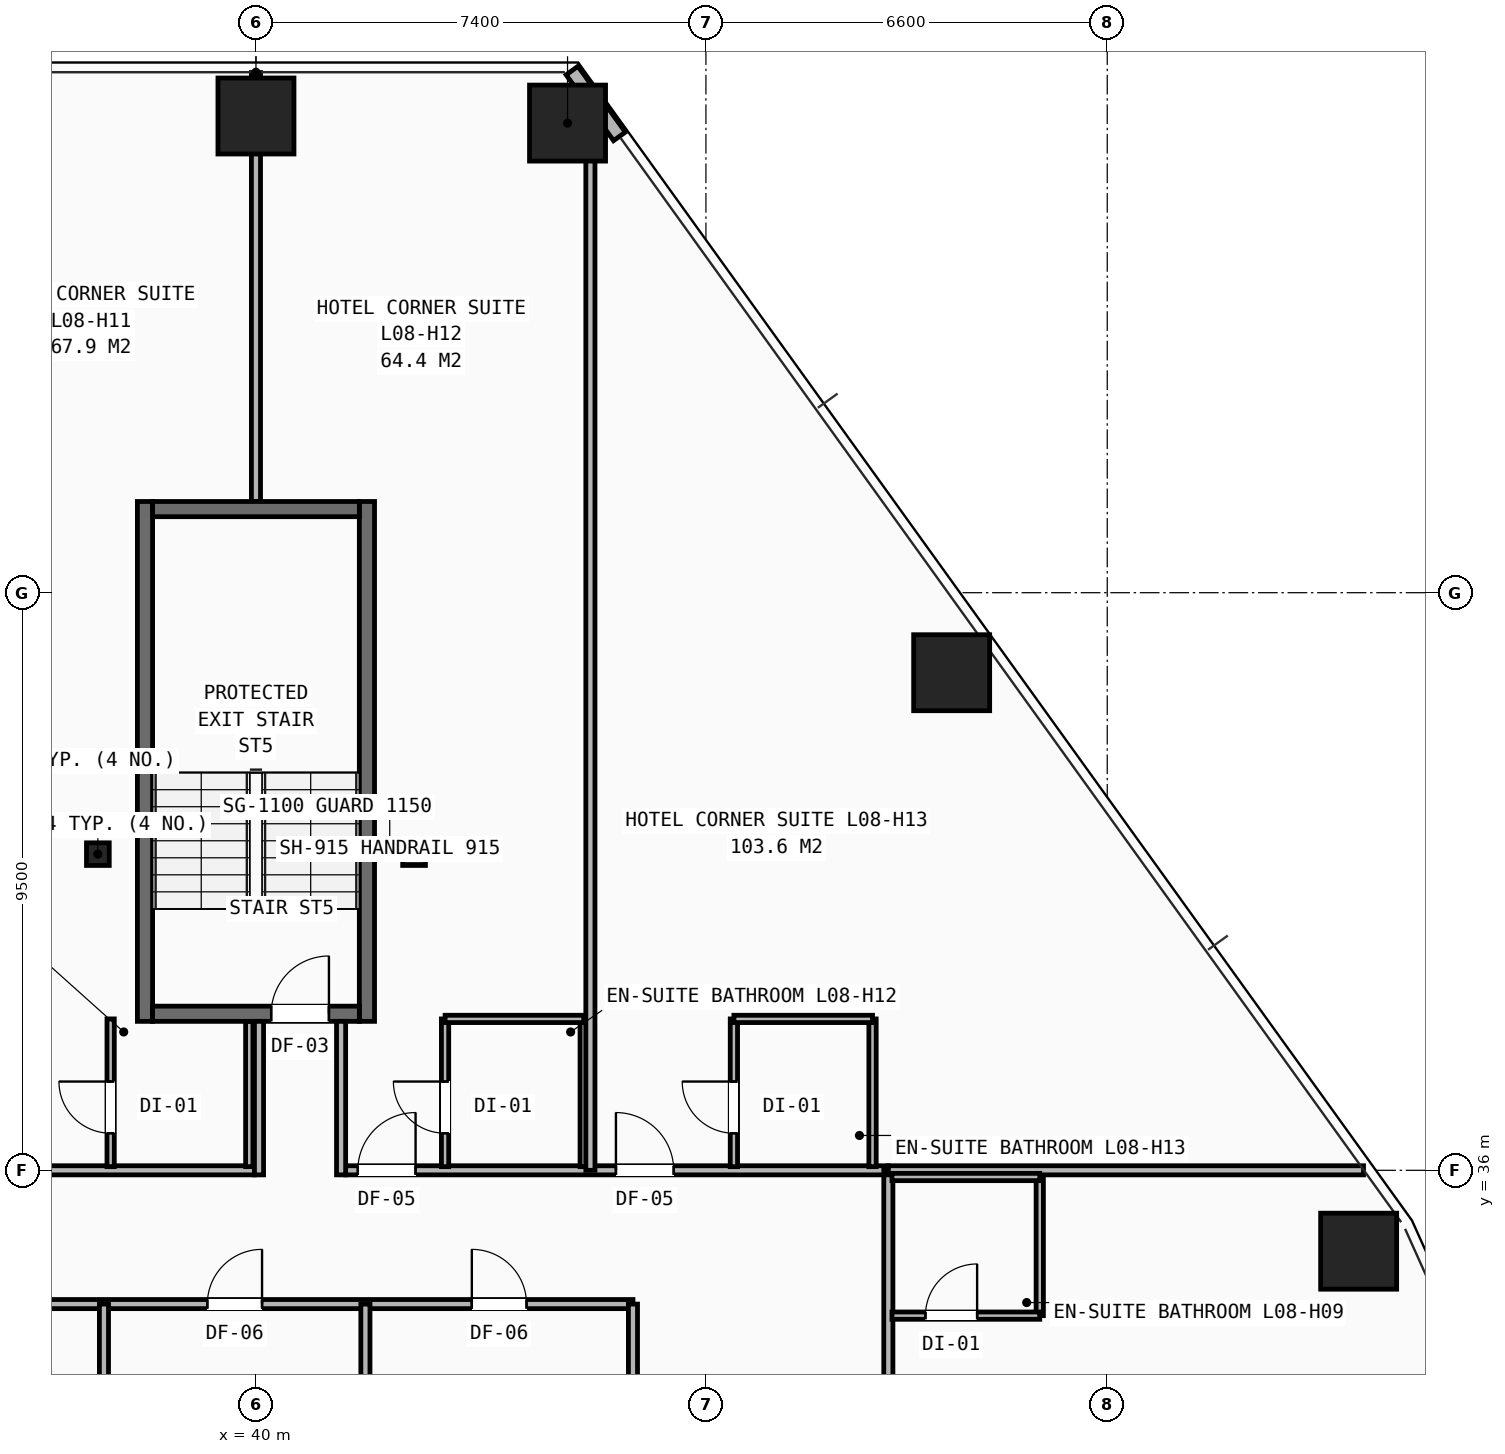
"""IFC4 building model, lengths in metres.
Left out: names, types, materials, properties, quantities, classifications, styles, units other than length and angle.
Written with IfcOpenShell. Run it as: python <this file> out.ifc"""

import sys

from ifc_helpers import new_model, si_unit, direction, frame, frame_2d, origin, origin_2d, place, context, subcontext, project, spatial, rectangle, hollow_rectangle, i_section, extrude, element, fill, save


model = new_model("IFC4")
c1 = context("Model", 3, precision=1e-05, world=origin(), true_north=direction((0.0, 1.0)))
c2 = subcontext(c1, "Body", "Model", "MODEL_VIEW")
j1 = project(units=[si_unit("LENGTHUNIT", "METRE"), si_unit("PLANEANGLEUNIT", "RADIAN")], contexts=[c1])
p1 = place(None, origin())
s1 = spatial("IfcSite", under=j1, at=p1, CompositionType="ELEMENT")
p2 = place(p1, origin())
s2 = spatial("IfcBuilding", under=s1, at=p2, CompositionType="ELEMENT")
p3 = place(p2, frame((0.0, 0.0, 33.6)))
s3 = spatial("IfcBuildingStorey", under=s2, at=p3, CompositionType="ELEMENT", Elevation=33.6)
for number, where, z_axis, x_axis in (
    (1, (37.4, 41.2, 0.0), (0.0, 0.0, 1.0), (1.0, 0.0, 0.0)),
    (2, (42.6, 41.2, 0.0), (0.0, 0.0, 1.0), (1.0, 0.0, 0.0)),
):
    element("IfcColumn", number, at=place(p3, frame(where, z_axis=z_axis, x_axis=x_axis)), inside=s3, PredefinedType="COLUMN", context=c2, shape_type="SweptSolid", body=[
        extrude(i_section(OverallWidth=0.374, OverallDepth=0.372, WebThickness=0.016, FlangeThickness=0.026, at=origin_2d()), origin(), (0.0, 0.0, 1.0), 3.2),
    ])
for number, where, z_axis, x_axis in (
    (3, (45.124, 53.223, 0.0), (0.0, 0.0, 1.0), (1.0, 0.0, 0.0)),
    (4, (40.0, 53.34, 0.0), (0.0, 0.0, 1.0), (1.0, 0.0, 0.0)),
    (5, (58.135, 34.67, 0.0), (0.0, 0.0, 1.0), (1.0, 0.0, 0.0)),
    (6, (51.441, 44.184, 0.0), (0.0, 0.0, 1.0), (1.0, 0.0, 0.0)),
):
    element("IfcColumn", number, at=place(p3, frame(where, z_axis=z_axis, x_axis=x_axis)), inside=s3, PredefinedType="COLUMN", context=c2, shape_type="SweptSolid", body=[
        extrude(hollow_rectangle(XDim=1.25, YDim=1.25, WallThickness=0.08, at=origin_2d()), origin(), (0.0, 0.0, 1.0), 3.2),
    ])
p4 = place(p3, frame((45.978, 53.005, 0.0), z_axis=(0.0, 0.0, 1.0), x_axis=(-0.584193864266, 0.811614150292, 0.0)))
e7 = element("IfcWall", 7, at=p4, inside=s3, PredefinedType="SHEAR", context=c2, shape_type="SweptSolid", body=[
    extrude(rectangle(XDim=1.334, YDim=0.24, at=frame_2d((0.667, 0.0))), origin(), (0.0, 0.0, 1.0), 2.263),
])
p5 = place(p3, frame((33.2, 33.8, 0.0), z_axis=(0.0, 0.0, 1.0), x_axis=(1.0, 0.0, 0.0)))
e8 = element("IfcWall", 8, at=p5, inside=s3, PredefinedType="PARTITIONING", context=c2, shape_type="SweptSolid", body=[
    extrude(rectangle(XDim=13.0, YDim=0.15, at=frame_2d((6.5, 0.0))), origin(), (0.0, 0.0, 1.0), 2.98),
])
p6 = place(p5, frame((1.7, 0.0, 0.0)))
e9 = element("IfcOpeningElement", 9, at=p6, cuts=e8, PredefinedType="OPENING", context=c2, shape_type="SweptSolid", body=[
    extrude(rectangle(XDim=0.9, YDim=2.1, at=frame_2d((0.45, 1.05))), frame((0.0, 0.085, 0.0), z_axis=(0.0, -1.0, 0.0), x_axis=(1.0, 0.0, 0.0)), (0.0, 0.0, 1.0), 0.17),
])
p7 = place(p5, frame((6.0, 0.0, 0.0)))
e10 = element("IfcOpeningElement", 10, at=p7, cuts=e8, PredefinedType="OPENING", context=c2, shape_type="SweptSolid", body=[
    extrude(rectangle(XDim=0.9, YDim=2.1, at=frame_2d((0.45, 1.05))), frame((0.0, 0.085, 0.0), z_axis=(0.0, -1.0, 0.0), x_axis=(1.0, 0.0, 0.0)), (0.0, 0.0, 1.0), 0.17),
])
p8 = place(p5, frame((10.35, 0.0, 0.0)))
e11 = element("IfcOpeningElement", 11, at=p8, cuts=e8, PredefinedType="OPENING", context=c2, shape_type="SweptSolid", body=[
    extrude(rectangle(XDim=0.9, YDim=2.1, at=frame_2d((0.45, 1.05))), frame((0.0, 0.085, 0.0), z_axis=(0.0, -1.0, 0.0), x_axis=(1.0, 0.0, 0.0)), (0.0, 0.0, 1.0), 0.17),
])
for number, where, z_axis, x_axis in (
    (12, (46.2, 31.2, 0.0), (0.0, 0.0, 1.0), (0.0, 1.0, 0.0)),
    (13, (37.5, 31.2, 0.0), (0.0, 0.0, 1.0), (0.0, 1.0, 0.0)),
    (14, (41.8, 31.2, 0.0), (0.0, 0.0, 1.0), (0.0, 1.0, 0.0)),
):
    element("IfcWall", number, at=place(p3, frame(where, z_axis=z_axis, x_axis=x_axis)), inside=s3, PredefinedType="PARTITIONING", context=c2, shape_type="SweptSolid", body=[
        extrude(rectangle(XDim=2.6, YDim=0.15, at=frame_2d((1.3, 0.0))), origin(), (0.0, 0.0, 1.0), 2.431),
    ])
p9 = place(p3, frame((29.6, 36.0, 0.0), z_axis=(0.0, 0.0, 1.0), x_axis=(1.0, 0.0, 0.0)))
e15 = element("IfcWall", 15, at=p9, inside=s3, PredefinedType="PARTITIONING", context=c2, shape_type="SweptSolid", body=[
    extrude(rectangle(XDim=10.375, YDim=0.15, at=frame_2d((5.188, 0.0))), origin(), (0.0, 0.0, 1.0), 2.98),
])
p10 = place(p9, frame((0.57, 0.0, 0.0)))
e16 = element("IfcOpeningElement", 16, at=p10, cuts=e15, PredefinedType="OPENING", context=c2, shape_type="SweptSolid", body=[
    extrude(rectangle(XDim=0.95, YDim=2.1, at=frame_2d((0.475, 1.05))), frame((0.0, 0.085, 0.0), z_axis=(0.0, -1.0, 0.0), x_axis=(1.0, 0.0, 0.0)), (0.0, 0.0, 1.0), 0.17),
])
p11 = place(p9, frame((5.32, 0.0, 0.0)))
e17 = element("IfcOpeningElement", 17, at=p11, cuts=e15, PredefinedType="OPENING", context=c2, shape_type="SweptSolid", body=[
    extrude(rectangle(XDim=0.95, YDim=2.1, at=frame_2d((0.475, 1.05))), frame((0.0, 0.085, 0.0), z_axis=(0.0, -1.0, 0.0), x_axis=(1.0, 0.0, 0.0)), (0.0, 0.0, 1.0), 0.17),
])
p12 = place(p3, frame((41.475, 36.0, 0.0), z_axis=(0.0, 0.0, 1.0), x_axis=(1.0, 0.0, 0.0)))
e18 = element("IfcWall", 18, at=p12, inside=s3, PredefinedType="PARTITIONING", context=c2, shape_type="SweptSolid", body=[
    extrude(rectangle(XDim=8.925, YDim=0.15, at=frame_2d((4.462, 0.0))), origin(), (0.0, 0.0, 1.0), 2.513),
])
p13 = place(p12, frame((0.2, 0.0, 0.0)))
e19 = element("IfcOpeningElement", 19, at=p13, cuts=e18, PredefinedType="OPENING", context=c2, shape_type="SweptSolid", body=[
    extrude(rectangle(XDim=0.95, YDim=2.1, at=frame_2d((0.475, 1.05))), frame((0.0, 0.085, 0.0), z_axis=(0.0, -1.0, 0.0), x_axis=(1.0, 0.0, 0.0)), (0.0, 0.0, 1.0), 0.17),
])
p14 = place(p12, frame((4.445, 0.0, 0.0)))
e20 = element("IfcOpeningElement", 20, at=p14, cuts=e18, PredefinedType="OPENING", context=c2, shape_type="SweptSolid", body=[
    extrude(rectangle(XDim=0.95, YDim=2.1, at=frame_2d((0.475, 1.05))), frame((0.0, 0.085, 0.0), z_axis=(0.0, -1.0, 0.0), x_axis=(1.0, 0.0, 0.0)), (0.0, 0.0, 1.0), 0.17),
])
p15 = place(p3, frame((50.4, 14.1, 0.0), z_axis=(0.0, 0.0, 1.0), x_axis=(0.0, 1.0, 0.0)))
e21 = element("IfcWall", 21, at=p15, inside=s3, PredefinedType="PARTITIONING", context=c2, shape_type="SweptSolid", body=[
    extrude(rectangle(XDim=21.9, YDim=0.15, at=frame_2d((10.95, 0.0))), origin(), (0.0, 0.0, 1.0), 2.191),
])
p16 = place(p15, frame((0.42, 0.0, 0.0)))
e22 = element("IfcOpeningElement", 22, at=p16, cuts=e21, PredefinedType="OPENING", context=c2, shape_type="SweptSolid", body=[
    extrude(rectangle(XDim=0.95, YDim=2.1, at=frame_2d((0.475, 1.05))), frame((0.0, 0.085, 0.0), z_axis=(0.0, -1.0, 0.0), x_axis=(1.0, 0.0, 0.0)), (0.0, 0.0, 1.0), 0.17),
])
p17 = place(p15, frame((7.82, 0.0, 0.0)))
e23 = element("IfcOpeningElement", 23, at=p17, cuts=e21, PredefinedType="OPENING", context=c2, shape_type="SweptSolid", body=[
    extrude(rectangle(XDim=0.95, YDim=2.1, at=frame_2d((0.475, 1.05))), frame((0.0, 0.085, 0.0), z_axis=(0.0, -1.0, 0.0), x_axis=(1.0, 0.0, 0.0)), (0.0, 0.0, 1.0), 0.17),
])
p18 = place(p15, frame((15.32, 0.0, 0.0)))
e24 = element("IfcOpeningElement", 24, at=p18, cuts=e21, PredefinedType="OPENING", context=c2, shape_type="SweptSolid", body=[
    extrude(rectangle(XDim=0.95, YDim=2.1, at=frame_2d((0.475, 1.05))), frame((0.0, 0.085, 0.0), z_axis=(0.0, -1.0, 0.0), x_axis=(1.0, 0.0, 0.0)), (0.0, 0.0, 1.0), 0.17),
])
p19 = place(p3, frame((50.4, 36.0, 0.0), z_axis=(0.0, 0.0, 1.0), x_axis=(1.0, 0.0, 0.0)))
e25 = element("IfcWall", 25, at=p19, inside=s3, PredefinedType="PARTITIONING", context=c2, shape_type="SweptSolid", body=[
    extrude(rectangle(XDim=7.814, YDim=0.15, at=frame_2d((3.907, 0.0))), origin(), (0.0, 0.0, 1.0), 2.268),
])
p20 = place(p3, frame((52.89, 33.61, 0.0), z_axis=(0.0, 0.0, 1.0), x_axis=(0.0, 1.0, 0.0)))
e26 = element("IfcWall", 26, at=p20, inside=s3, PredefinedType="PARTITIONING", context=c2, shape_type="SweptSolid", body=[
    extrude(rectangle(XDim=2.28, YDim=0.12, at=frame_2d((1.14, 0.0))), origin(), (0.0, 0.0, 1.0), 2.98),
])
p21 = place(p3, frame((50.46, 33.61, 0.0), z_axis=(0.0, 0.0, 1.0), x_axis=(1.0, 0.0, 0.0)))
e27 = element("IfcWall", 27, at=p21, inside=s3, PredefinedType="PARTITIONING", context=c2, shape_type="SweptSolid", body=[
    extrude(rectangle(XDim=2.43, YDim=0.12, at=frame_2d((1.215, 0.0))), origin(), (0.0, 0.0, 1.0), 2.513),
])
p22 = place(p21, frame((0.55, 0.0, 0.0)))
e28 = element("IfcOpeningElement", 28, at=p22, cuts=e27, PredefinedType="OPENING", context=c2, shape_type="SweptSolid", body=[
    extrude(rectangle(XDim=0.85, YDim=2.05, at=frame_2d((0.425, 1.025))), frame((0.0, 0.07, 0.0), z_axis=(0.0, -1.0, 0.0), x_axis=(1.0, 0.0, 0.0)), (0.0, 0.0, 1.0), 0.14),
])
p23 = place(p3, frame((50.46, 35.89, 0.0), z_axis=(0.0, 0.0, 1.0), x_axis=(1.0, 0.0, 0.0)))
e29 = element("IfcWall", 29, at=p23, inside=s3, PredefinedType="PARTITIONING", context=c2, shape_type="SweptSolid", body=[
    extrude(rectangle(XDim=2.43, YDim=0.12, at=frame_2d((1.215, 0.0))), origin(), (0.0, 0.0, 1.0), 2.513),
])
p24 = place(p3, frame((37.61, 36.06, 0.0), z_axis=(0.0, 0.0, 1.0), x_axis=(0.0, 1.0, 0.0)))
e30 = element("IfcWall", 30, at=p24, inside=s3, PredefinedType="PARTITIONING", context=c2, shape_type="SweptSolid", body=[
    extrude(rectangle(XDim=2.43, YDim=0.12, at=frame_2d((1.215, 0.0))), origin(), (0.0, 0.0, 1.0), 2.98),
])
p25 = place(p24, frame((0.55, 0.0, 0.0)))
e31 = element("IfcOpeningElement", 31, at=p25, cuts=e30, PredefinedType="OPENING", context=c2, shape_type="SweptSolid", body=[
    extrude(rectangle(XDim=0.85, YDim=2.05, at=frame_2d((0.425, 1.025))), frame((0.0, 0.07, 0.0), z_axis=(0.0, -1.0, 0.0), x_axis=(1.0, 0.0, 0.0)), (0.0, 0.0, 1.0), 0.14),
])
p26 = place(p3, frame((39.89, 36.06, 0.0), z_axis=(0.0, 0.0, 1.0), x_axis=(0.0, 1.0, 0.0)))
e32 = element("IfcWall", 32, at=p26, inside=s3, PredefinedType="PARTITIONING", context=c2, shape_type="SweptSolid", body=[
    extrude(rectangle(XDim=2.39, YDim=0.12, at=frame_2d((1.195, 0.0))), origin(), (0.0, 0.0, 1.0), 2.98),
])
p27 = place(p3, frame((40.0, 47.0, 0.0), z_axis=(0.0, 0.0, 1.0), x_axis=(0.0, 1.0, 0.0)))
e33 = element("IfcWall", 33, at=p27, inside=s3, PredefinedType="PARTITIONING", context=c2, shape_type="SweptSolid", body=[
    extrude(rectangle(XDim=7.055, YDim=0.15, at=frame_2d((3.528, 0.0))), origin(), (0.0, 0.0, 1.0), 2.268),
])
p28 = place(p3, frame((43.11, 36.06, 0.0), z_axis=(0.0, 0.0, 1.0), x_axis=(0.0, 1.0, 0.0)))
e34 = element("IfcWall", 34, at=p28, inside=s3, PredefinedType="PARTITIONING", context=c2, shape_type="SweptSolid", body=[
    extrude(rectangle(XDim=2.43, YDim=0.12, at=frame_2d((1.215, 0.0))), origin(), (0.0, 0.0, 1.0), 2.98),
])
p29 = place(p28, frame((0.55, 0.0, 0.0)))
e35 = element("IfcOpeningElement", 35, at=p29, cuts=e34, PredefinedType="OPENING", context=c2, shape_type="SweptSolid", body=[
    extrude(rectangle(XDim=0.85, YDim=2.05, at=frame_2d((0.425, 1.025))), frame((0.0, 0.07, 0.0), z_axis=(0.0, -1.0, 0.0), x_axis=(1.0, 0.0, 0.0)), (0.0, 0.0, 1.0), 0.14),
])
p30 = place(p3, frame((45.39, 36.06, 0.0), z_axis=(0.0, 0.0, 1.0), x_axis=(0.0, 1.0, 0.0)))
e36 = element("IfcWall", 36, at=p30, inside=s3, PredefinedType="PARTITIONING", context=c2, shape_type="SweptSolid", body=[
    extrude(rectangle(XDim=2.43, YDim=0.12, at=frame_2d((1.215, 0.0))), origin(), (0.0, 0.0, 1.0), 2.98),
])
p31 = place(p3, frame((43.11, 38.49, 0.0), z_axis=(0.0, 0.0, 1.0), x_axis=(1.0, 0.0, 0.0)))
e37 = element("IfcWall", 37, at=p31, inside=s3, PredefinedType="PARTITIONING", context=c2, shape_type="SweptSolid", body=[
    extrude(rectangle(XDim=2.28, YDim=0.12, at=frame_2d((1.14, 0.0))), origin(), (0.0, 0.0, 1.0), 2.98),
])
p32 = place(p3, frame((45.5, 36.0, 0.0), z_axis=(0.0, 0.0, 1.0), x_axis=(0.0, 1.0, 0.0)))
e38 = element("IfcWall", 38, at=p32, inside=s3, PredefinedType="PARTITIONING", context=c2, shape_type="SweptSolid", body=[
    extrude(rectangle(XDim=17.66, YDim=0.15, at=frame_2d((8.83, 0.0))), origin(), (0.0, 0.0, 1.0), 2.191),
])
p33 = place(p3, frame((47.86, 36.06, 0.0), z_axis=(0.0, 0.0, 1.0), x_axis=(0.0, 1.0, 0.0)))
e39 = element("IfcWall", 39, at=p33, inside=s3, PredefinedType="PARTITIONING", context=c2, shape_type="SweptSolid", body=[
    extrude(rectangle(XDim=2.43, YDim=0.12, at=frame_2d((1.215, 0.0))), origin(), (0.0, 0.0, 1.0), 2.98),
])
p34 = place(p33, frame((0.55, 0.0, 0.0)))
e40 = element("IfcOpeningElement", 40, at=p34, cuts=e39, PredefinedType="OPENING", context=c2, shape_type="SweptSolid", body=[
    extrude(rectangle(XDim=0.85, YDim=2.05, at=frame_2d((0.425, 1.025))), frame((0.0, 0.07, 0.0), z_axis=(0.0, -1.0, 0.0), x_axis=(1.0, 0.0, 0.0)), (0.0, 0.0, 1.0), 0.14),
])
p35 = place(p3, frame((50.14, 36.06, 0.0), z_axis=(0.0, 0.0, 1.0), x_axis=(0.0, 1.0, 0.0)))
e41 = element("IfcWall", 41, at=p35, inside=s3, PredefinedType="PARTITIONING", context=c2, shape_type="SweptSolid", body=[
    extrude(rectangle(XDim=2.43, YDim=0.12, at=frame_2d((1.215, 0.0))), origin(), (0.0, 0.0, 1.0), 2.513),
])
p36 = place(p3, frame((47.86, 38.49, 0.0), z_axis=(0.0, 0.0, 1.0), x_axis=(1.0, 0.0, 0.0)))
e42 = element("IfcWall", 42, at=p36, inside=s3, PredefinedType="PARTITIONING", context=c2, shape_type="SweptSolid", body=[
    extrude(rectangle(XDim=2.28, YDim=0.12, at=frame_2d((1.14, 0.0))), origin(), (0.0, 0.0, 1.0), 2.513),
])
for number, where, z_axis, x_axis in (
    (43, (38.175, 38.45, 0.0), (0.0, 0.0, 1.0), (0.0, 1.0, 0.0)),
    (44, (41.825, 38.45, 0.0), (0.0, 0.0, 1.0), (0.0, 1.0, 0.0)),
):
    element("IfcWall", number, at=place(p3, frame(where, z_axis=z_axis, x_axis=x_axis)), inside=s3, PredefinedType="SHEAR", context=c2, shape_type="SweptSolid", body=[
        extrude(rectangle(XDim=8.55, YDim=0.25, at=frame_2d((4.275, 0.0))), origin(), (0.0, 0.0, 1.0), 2.98),
    ])
p37 = place(p3, frame((38.3, 38.575, 0.0), z_axis=(0.0, 0.0, 1.0), x_axis=(1.0, 0.0, 0.0)))
e45 = element("IfcWall", 45, at=p37, inside=s3, PredefinedType="SHEAR", context=c2, shape_type="SweptSolid", body=[
    extrude(rectangle(XDim=3.4, YDim=0.25, at=frame_2d((1.7, 0.0))), origin(), (0.0, 0.0, 1.0), 2.98),
])
p38 = place(p37, frame((1.95, 0.0, 0.0)))
e46 = element("IfcOpeningElement", 46, at=p38, cuts=e45, PredefinedType="OPENING", context=c2, shape_type="SweptSolid", body=[
    extrude(rectangle(XDim=0.95, YDim=2.1, at=frame_2d((0.475, 1.05))), frame((0.0, 0.135, 0.0), z_axis=(0.0, -1.0, 0.0), x_axis=(1.0, 0.0, 0.0)), (0.0, 0.0, 1.0), 0.27),
])
p39 = place(p3, frame((38.3, 46.875, 0.0), z_axis=(0.0, 0.0, 1.0), x_axis=(1.0, 0.0, 0.0)))
e47 = element("IfcWall", 47, at=p39, inside=s3, PredefinedType="SHEAR", context=c2, shape_type="SweptSolid", body=[
    extrude(rectangle(XDim=3.4, YDim=0.25, at=frame_2d((1.7, 0.0))), origin(), (0.0, 0.0, 1.0), 2.98),
])
for number, where, z_axis, x_axis in (
    (48, (40.05, 35.925, 0.0), (0.0, 0.0, 1.0), (0.0, 1.0, 0.0)),
    (49, (41.4, 35.925, 0.0), (0.0, 0.0, 1.0), (0.0, 1.0, 0.0)),
):
    element("IfcWall", number, at=place(p3, frame(where, z_axis=z_axis, x_axis=x_axis)), inside=s3, PredefinedType="PARTITIONING", context=c2, shape_type="SweptSolid", body=[
        extrude(rectangle(XDim=2.525, YDim=0.15, at=frame_2d((1.262, 0.0))), origin(), (0.0, 0.0, 1.0), 2.98),
    ])
p40 = place(p7, origin())
e50 = element("IfcDoor", 50, at=p40, inside=s3, OperationType="SINGLE_SWING_RIGHT", PredefinedType="DOOR", context=c2, shape_type="SweptSolid", body=[
    extrude(rectangle(XDim=0.9, YDim=2.1, at=frame_2d((0.45, 1.05))), frame((0.0, 0.025, 0.0), z_axis=(0.0, -1.0, 0.0), x_axis=(1.0, 0.0, 0.0)), (0.0, 0.0, 1.0), 0.05),
])
fill(e10, e50)
p41 = place(p8, origin())
e51 = element("IfcDoor", 51, at=p41, inside=s3, OperationType="SINGLE_SWING_LEFT", PredefinedType="DOOR", context=c2, shape_type="SweptSolid", body=[
    extrude(rectangle(XDim=0.9, YDim=2.1, at=frame_2d((0.45, 1.05))), frame((0.0, 0.025, 0.0), z_axis=(0.0, -1.0, 0.0), x_axis=(1.0, 0.0, 0.0)), (0.0, 0.0, 1.0), 0.05),
])
fill(e11, e51)
p42 = place(p22, origin())
e52 = element("IfcDoor", 52, at=p42, inside=s3, OperationType="SINGLE_SWING_RIGHT", PredefinedType="DOOR", context=c2, shape_type="SweptSolid", body=[
    extrude(rectangle(XDim=0.85, YDim=2.05, at=frame_2d((0.425, 1.025))), frame((0.0, 0.025, 0.0), z_axis=(0.0, -1.0, 0.0), x_axis=(1.0, 0.0, 0.0)), (0.0, 0.0, 1.0), 0.05),
])
fill(e28, e52)
p43 = place(p25, origin())
e53 = element("IfcDoor", 53, at=p43, inside=s3, OperationType="SINGLE_SWING_RIGHT", PredefinedType="DOOR", context=c2, shape_type="SweptSolid", body=[
    extrude(rectangle(XDim=0.85, YDim=2.05, at=frame_2d((0.425, 1.025))), frame((0.0, 0.025, 0.0), z_axis=(0.0, -1.0, 0.0), x_axis=(1.0, 0.0, 0.0)), (0.0, 0.0, 1.0), 0.05),
])
fill(e31, e53)
p44 = place(p13, origin())
e54 = element("IfcDoor", 54, at=p44, inside=s3, OperationType="SINGLE_SWING_RIGHT", PredefinedType="DOOR", context=c2, shape_type="SweptSolid", body=[
    extrude(rectangle(XDim=0.95, YDim=2.1, at=frame_2d((0.475, 1.05))), frame((0.0, 0.025, 0.0), z_axis=(0.0, -1.0, 0.0), x_axis=(1.0, 0.0, 0.0)), (0.0, 0.0, 1.0), 0.05),
])
fill(e19, e54)
p45 = place(p29, origin())
e55 = element("IfcDoor", 55, at=p45, inside=s3, OperationType="SINGLE_SWING_RIGHT", PredefinedType="DOOR", context=c2, shape_type="SweptSolid", body=[
    extrude(rectangle(XDim=0.85, YDim=2.05, at=frame_2d((0.425, 1.025))), frame((0.0, 0.025, 0.0), z_axis=(0.0, -1.0, 0.0), x_axis=(1.0, 0.0, 0.0)), (0.0, 0.0, 1.0), 0.05),
])
fill(e35, e55)
p46 = place(p14, origin())
e56 = element("IfcDoor", 56, at=p46, inside=s3, OperationType="SINGLE_SWING_LEFT", PredefinedType="DOOR", context=c2, shape_type="SweptSolid", body=[
    extrude(rectangle(XDim=0.95, YDim=2.1, at=frame_2d((0.475, 1.05))), frame((0.0, 0.025, 0.0), z_axis=(0.0, -1.0, 0.0), x_axis=(1.0, 0.0, 0.0)), (0.0, 0.0, 1.0), 0.05),
])
fill(e20, e56)
p47 = place(p34, origin())
e57 = element("IfcDoor", 57, at=p47, inside=s3, OperationType="SINGLE_SWING_RIGHT", PredefinedType="DOOR", context=c2, shape_type="SweptSolid", body=[
    extrude(rectangle(XDim=0.85, YDim=2.05, at=frame_2d((0.425, 1.025))), frame((0.0, 0.025, 0.0), z_axis=(0.0, -1.0, 0.0), x_axis=(1.0, 0.0, 0.0)), (0.0, 0.0, 1.0), 0.05),
])
fill(e40, e57)
p48 = place(p38, origin())
e58 = element("IfcDoor", 58, at=p48, inside=s3, OperationType="SINGLE_SWING_RIGHT", PredefinedType="DOOR", context=c2, shape_type="SweptSolid", body=[
    extrude(rectangle(XDim=0.95, YDim=2.1, at=frame_2d((0.475, 1.05))), frame((0.0, 0.025, 0.0), z_axis=(0.0, -1.0, 0.0), x_axis=(1.0, 0.0, 0.0)), (0.0, 0.0, 1.0), 0.05),
])
fill(e46, e58)
save(model, sys.argv[1])
